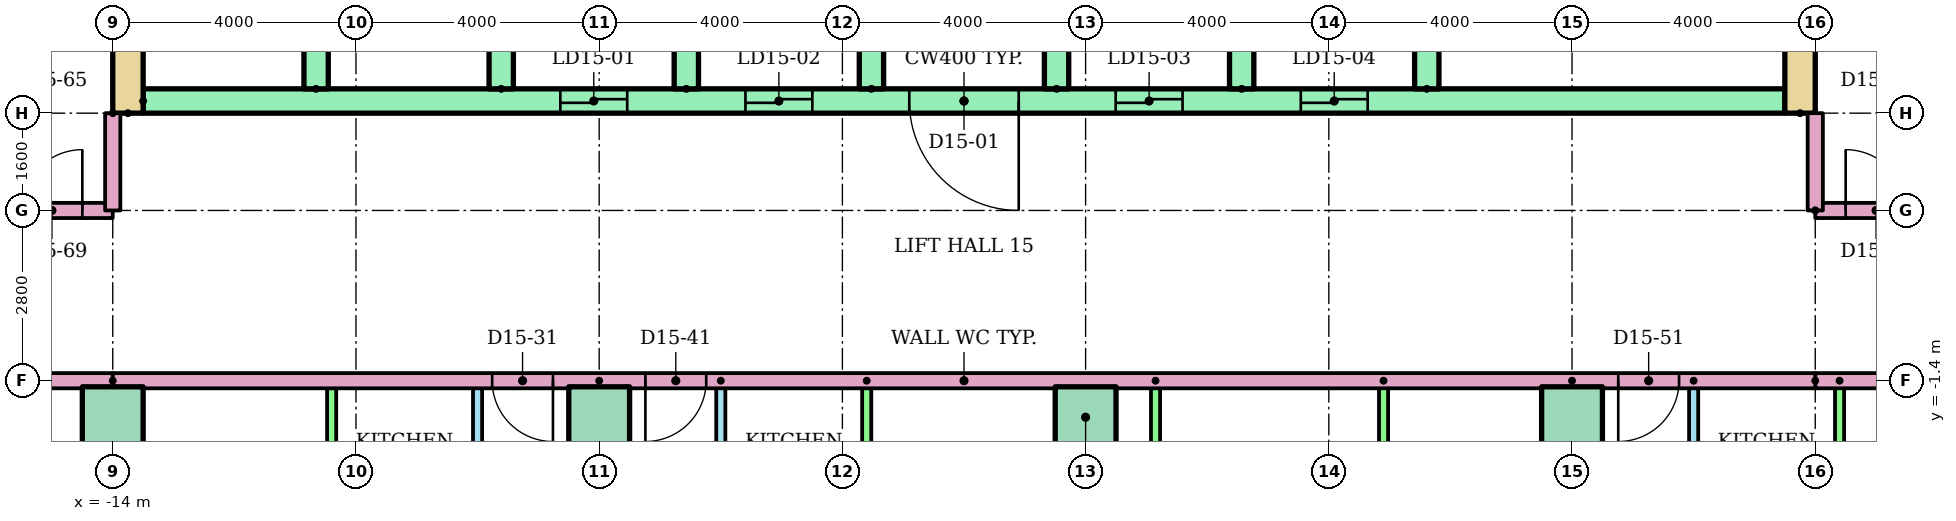
"""IFC4 building model, lengths in metres.
Left out: names, types, materials, properties, quantities, classifications, styles, units other than length and angle.
Written with IfcOpenShell. Run it as: python <this file> out.ifc"""

import sys

from ifc_helpers import new_model, si_unit, direction, frame, frame_2d, origin, origin_2d, place, context, subcontext, project, spatial, rectangle, extrude, element, fill, save


model = new_model("IFC4")
c1 = context("Model", 3, precision=1e-05, world=origin(), true_north=direction((0.0, 1.0)))
c2 = subcontext(c1, "Body", "Model", "MODEL_VIEW")
j1 = project(units=[si_unit("LENGTHUNIT", "METRE"), si_unit("PLANEANGLEUNIT", "RADIAN")], contexts=[c1])
p1 = place(None, origin())
s1 = spatial("IfcSite", under=j1, at=p1, CompositionType="ELEMENT")
p2 = place(p1, origin())
s2 = spatial("IfcBuilding", under=s1, at=p2, CompositionType="ELEMENT")
p3 = place(p2, frame((0.0, 0.0, 57.6)))
s3 = spatial("IfcBuildingStorey", under=s2, at=p3, CompositionType="ELEMENT", Elevation=57.6)
for number, where in (
    (1, (-14.0, -2.0, 0.0)),
    (2, (-6.0, -2.0, 0.0)),
    (3, (2.0, -2.0, 0.0)),
    (4, (10.0, -2.0, 0.0)),
):
    element("IfcColumn", number, at=place(p3, frame(where)), inside=s3, PredefinedType="COLUMN", context=c2, shape_type="SweptSolid", body=[
        extrude(rectangle(XDim=1.0, YDim=1.0, at=origin_2d()), origin(), (0.0, 0.0, 1.0), 3.2),
    ])
for number, where, z_axis, x_axis in (
    (5, (-13.75, 3.0, 0.0), (0.0, 0.0, 1.0), (0.0, 1.0, 0.0)),
    (6, (13.75, 3.0, 0.0), (0.0, 0.0, 1.0), (0.0, 1.0, 0.0)),
):
    element("IfcWall", number, at=place(p3, frame(where, z_axis=z_axis, x_axis=x_axis)), inside=s3, PredefinedType="SHEAR", context=c2, shape_type="SweptSolid", body=[
        extrude(rectangle(XDim=17.0, YDim=0.5, at=frame_2d((8.5, 0.0))), origin(), (0.0, 0.0, 1.0), 2.92),
    ])
p4 = place(p3, frame((-13.5, 3.2, 0.0)))
e7 = element("IfcWall", 7, at=p4, inside=s3, PredefinedType="SHEAR", context=c2, shape_type="SweptSolid", body=[
    extrude(rectangle(XDim=27.0, YDim=0.4, at=frame_2d((13.5, 0.0))), origin(), (0.0, 0.0, 1.0), 2.92),
])
p5 = place(p4, frame((6.861, 0.0, 0.0)))
e8 = element("IfcOpeningElement", 8, at=p5, cuts=e7, PredefinedType="OPENING", context=c2, shape_type="SweptSolid", body=[
    extrude(rectangle(XDim=1.1, YDim=2.1, at=frame_2d((0.55, 1.05))), frame((0.0, 0.21, 0.0), z_axis=(0.0, -1.0, 0.0), x_axis=(1.0, 0.0, 0.0)), (0.0, 0.0, 1.0), 0.42),
])
p6 = place(p4, frame((9.906, 0.0, 0.0)))
e9 = element("IfcOpeningElement", 9, at=p6, cuts=e7, PredefinedType="OPENING", context=c2, shape_type="SweptSolid", body=[
    extrude(rectangle(XDim=1.1, YDim=2.1, at=frame_2d((0.55, 1.05))), frame((0.0, 0.21, 0.0), z_axis=(0.0, -1.0, 0.0), x_axis=(1.0, 0.0, 0.0)), (0.0, 0.0, 1.0), 0.42),
])
p7 = place(p4, frame((15.994, 0.0, 0.0)))
e10 = element("IfcOpeningElement", 10, at=p7, cuts=e7, PredefinedType="OPENING", context=c2, shape_type="SweptSolid", body=[
    extrude(rectangle(XDim=1.1, YDim=2.1, at=frame_2d((0.55, 1.05))), frame((0.0, 0.21, 0.0), z_axis=(0.0, -1.0, 0.0), x_axis=(1.0, 0.0, 0.0)), (0.0, 0.0, 1.0), 0.42),
])
p8 = place(p4, frame((19.039, 0.0, 0.0)))
e11 = element("IfcOpeningElement", 11, at=p8, cuts=e7, PredefinedType="OPENING", context=c2, shape_type="SweptSolid", body=[
    extrude(rectangle(XDim=1.1, YDim=2.1, at=frame_2d((0.55, 1.05))), frame((0.0, 0.21, 0.0), z_axis=(0.0, -1.0, 0.0), x_axis=(1.0, 0.0, 0.0)), (0.0, 0.0, 1.0), 0.42),
])
p9 = place(p4, frame((12.6, 0.0, 0.0)))
e12 = element("IfcOpeningElement", 12, at=p9, cuts=e7, PredefinedType="OPENING", context=c2, shape_type="SweptSolid", body=[
    extrude(rectangle(XDim=1.8, YDim=2.1, at=frame_2d((0.9, 1.05))), frame((0.0, 0.21, 0.0), z_axis=(0.0, -1.0, 0.0), x_axis=(1.0, 0.0, 0.0)), (0.0, 0.0, 1.0), 0.42),
])
for number, where, z_axis, x_axis in (
    (13, (-10.656, 3.4, 0.0), (0.0, 0.0, 1.0), (0.0, 1.0, 0.0)),
    (14, (-7.611, 3.4, 0.0), (0.0, 0.0, 1.0), (0.0, 1.0, 0.0)),
    (15, (-4.567, 3.4, 0.0), (0.0, 0.0, 1.0), (0.0, 1.0, 0.0)),
    (16, (-1.522, 3.4, 0.0), (0.0, 0.0, 1.0), (0.0, 1.0, 0.0)),
    (17, (1.522, 3.4, 0.0), (0.0, 0.0, 1.0), (0.0, 1.0, 0.0)),
    (18, (4.567, 3.4, 0.0), (0.0, 0.0, 1.0), (0.0, 1.0, 0.0)),
    (19, (7.611, 3.4, 0.0), (0.0, 0.0, 1.0), (0.0, 1.0, 0.0)),
):
    element("IfcWall", number, at=place(p3, frame(where, z_axis=z_axis, x_axis=x_axis)), inside=s3, PredefinedType="SHEAR", context=c2, shape_type="SweptSolid", body=[
        extrude(rectangle(XDim=3.0, YDim=0.4, at=frame_2d((1.5, 0.0))), origin(), (0.0, 0.0, 1.0), 2.92),
    ])
p10 = place(p3, frame((-8.0, -6.6, 0.0), z_axis=(0.0, 0.0, 1.0), x_axis=(0.0, 1.0, 0.0)))
e20 = element("IfcWall", 20, at=p10, inside=s3, PredefinedType="PARTITIONING", context=c2, shape_type="SweptSolid", body=[
    extrude(rectangle(XDim=5.2, YDim=0.15, at=frame_2d((2.6, 0.0))), origin(), (0.0, 0.0, 1.0), 2.4),
])
p11 = place(p10, frame((2.94, 0.0, 0.0)))
e21 = element("IfcOpeningElement", 21, at=p11, cuts=e20, PredefinedType="OPENING", context=c2, shape_type="SweptSolid", body=[
    extrude(rectangle(XDim=0.9, YDim=2.1, at=frame_2d((0.45, 1.05))), frame((0.0, 0.085, 0.0), z_axis=(0.0, -1.0, 0.0), x_axis=(1.0, 0.0, 0.0)), (0.0, 0.0, 1.0), 0.17),
])
p12 = place(p10, frame((0.825, 0.0, 0.0)))
e22 = element("IfcOpeningElement", 22, at=p12, cuts=e20, PredefinedType="OPENING", context=c2, shape_type="SweptSolid", body=[
    extrude(rectangle(XDim=0.8, YDim=2.1, at=frame_2d((0.4, 1.05))), frame((0.0, 0.085, 0.0), z_axis=(0.0, -1.0, 0.0), x_axis=(1.0, 0.0, 0.0)), (0.0, 0.0, 1.0), 0.17),
])
p13 = place(p3, frame((-10.4, -6.6, 0.0), z_axis=(0.0, 0.0, 1.0), x_axis=(0.0, 1.0, 0.0)))
e23 = element("IfcWall", 23, at=p13, inside=s3, PredefinedType="PARTITIONING", context=c2, shape_type="SweptSolid", body=[
    extrude(rectangle(XDim=5.2, YDim=0.15, at=frame_2d((2.6, 0.0))), origin(), (0.0, 0.0, 1.0), 2.4),
])
p14 = place(p3, frame((-4.0, -1.4, 0.0), z_axis=(0.0, 0.0, 1.0), x_axis=(0.0, -1.0, 0.0)))
e24 = element("IfcWall", 24, at=p14, inside=s3, PredefinedType="PARTITIONING", context=c2, shape_type="SweptSolid", body=[
    extrude(rectangle(XDim=5.2, YDim=0.15, at=frame_2d((2.6, 0.0))), origin(), (0.0, 0.0, 1.0), 2.4),
])
p15 = place(p14, frame((1.36, 0.0, 0.0)))
e25 = element("IfcOpeningElement", 25, at=p15, cuts=e24, PredefinedType="OPENING", context=c2, shape_type="SweptSolid", body=[
    extrude(rectangle(XDim=0.9, YDim=2.1, at=frame_2d((0.45, 1.05))), frame((0.0, 0.085, 0.0), z_axis=(0.0, -1.0, 0.0), x_axis=(1.0, 0.0, 0.0)), (0.0, 0.0, 1.0), 0.17),
])
p16 = place(p14, frame((3.575, 0.0, 0.0)))
e26 = element("IfcOpeningElement", 26, at=p16, cuts=e24, PredefinedType="OPENING", context=c2, shape_type="SweptSolid", body=[
    extrude(rectangle(XDim=0.8, YDim=2.1, at=frame_2d((0.4, 1.05))), frame((0.0, 0.085, 0.0), z_axis=(0.0, -1.0, 0.0), x_axis=(1.0, 0.0, 0.0)), (0.0, 0.0, 1.0), 0.17),
])
for number, where, z_axis, x_axis in (
    (27, (-1.6, -1.4, 0.0), (0.0, 0.0, 1.0), (0.0, -1.0, 0.0)),
    (28, (3.15, -1.4, 0.0), (0.0, 0.0, 1.0), (0.0, -1.0, 0.0)),
    (29, (6.9, -1.4, 0.0), (0.0, 0.0, 1.0), (0.0, -1.0, 0.0)),
):
    element("IfcWall", number, at=place(p3, frame(where, z_axis=z_axis, x_axis=x_axis)), inside=s3, PredefinedType="PARTITIONING", context=c2, shape_type="SweptSolid", body=[
        extrude(rectangle(XDim=5.2, YDim=0.15, at=frame_2d((2.6, 0.0))), origin(), (0.0, 0.0, 1.0), 2.4),
    ])
p17 = place(p3, frame((-6.0, -1.4, 0.0), z_axis=(0.0, 0.0, 1.0), x_axis=(0.0, -1.0, 0.0)))
e30 = element("IfcWall", 30, at=p17, inside=s3, PredefinedType="PARTITIONING", context=c2, shape_type="SweptSolid", body=[
    extrude(rectangle(XDim=14.71, YDim=0.25, at=frame_2d((7.355, 0.0))), origin(), (0.0, 0.0, 1.0), 2.4),
])
p18 = place(p3, frame((12.0, -1.4, 0.0), z_axis=(0.0, 0.0, 1.0), x_axis=(0.0, -1.0, 0.0)))
e31 = element("IfcWall", 31, at=p18, inside=s3, PredefinedType="PARTITIONING", context=c2, shape_type="SweptSolid", body=[
    extrude(rectangle(XDim=5.2, YDim=0.15, at=frame_2d((2.6, 0.0))), origin(), (0.0, 0.0, 1.0), 2.4),
])
p19 = place(p18, frame((1.36, 0.0, 0.0)))
e32 = element("IfcOpeningElement", 32, at=p19, cuts=e31, PredefinedType="OPENING", context=c2, shape_type="SweptSolid", body=[
    extrude(rectangle(XDim=0.9, YDim=2.1, at=frame_2d((0.45, 1.05))), frame((0.0, 0.085, 0.0), z_axis=(0.0, -1.0, 0.0), x_axis=(1.0, 0.0, 0.0)), (0.0, 0.0, 1.0), 0.17),
])
p20 = place(p18, frame((3.575, 0.0, 0.0)))
e33 = element("IfcOpeningElement", 33, at=p20, cuts=e31, PredefinedType="OPENING", context=c2, shape_type="SweptSolid", body=[
    extrude(rectangle(XDim=0.8, YDim=2.1, at=frame_2d((0.4, 1.05))), frame((0.0, 0.085, 0.0), z_axis=(0.0, -1.0, 0.0), x_axis=(1.0, 0.0, 0.0)), (0.0, 0.0, 1.0), 0.17),
])
p21 = place(p3, frame((14.4, -1.4, 0.0), z_axis=(0.0, 0.0, 1.0), x_axis=(0.0, -1.0, 0.0)))
e34 = element("IfcWall", 34, at=p21, inside=s3, PredefinedType="PARTITIONING", context=c2, shape_type="SweptSolid", body=[
    extrude(rectangle(XDim=5.2, YDim=0.15, at=frame_2d((2.6, 0.0))), origin(), (0.0, 0.0, 1.0), 2.4),
])
p22 = place(p3, frame((10.0, -1.4, 0.0), z_axis=(0.0, 0.0, 1.0), x_axis=(0.0, -1.0, 0.0)))
e35 = element("IfcWall", 35, at=p22, inside=s3, PredefinedType="PARTITIONING", context=c2, shape_type="SweptSolid", body=[
    extrude(rectangle(XDim=14.71, YDim=0.25, at=frame_2d((7.355, 0.0))), origin(), (0.0, 0.0, 1.0), 2.4),
])
p23 = place(p3, frame((-14.0, -1.4, 0.0), z_axis=(0.0, 0.0, 1.0), x_axis=(-1.0, 0.0, 0.0)))
e36 = element("IfcWall", 36, at=p23, inside=s3, PredefinedType="PARTITIONING", context=c2, shape_type="SweptSolid", body=[
    extrude(rectangle(XDim=15.0, YDim=0.25, at=frame_2d((7.5, 0.0))), origin(), (0.0, 0.0, 1.0), 2.4),
])
p24 = place(p23, frame((8.76, 0.0, 0.0)))
e37 = element("IfcOpeningElement", 37, at=p24, cuts=e36, PredefinedType="OPENING", context=c2, shape_type="SweptSolid", body=[
    extrude(rectangle(XDim=1.0, YDim=2.1, at=frame_2d((0.5, 1.05))), frame((0.0, 0.135, 0.0), z_axis=(0.0, -1.0, 0.0), x_axis=(1.0, 0.0, 0.0)), (0.0, 0.0, 1.0), 0.27),
])
p25 = place(p3, frame((29.0, -1.4, 0.0), z_axis=(0.0, 0.0, 1.0), x_axis=(-1.0, 0.0, 0.0)))
e38 = element("IfcWall", 38, at=p25, inside=s3, PredefinedType="PARTITIONING", context=c2, shape_type="SweptSolid", body=[
    extrude(rectangle(XDim=15.0, YDim=0.25, at=frame_2d((7.5, 0.0))), origin(), (0.0, 0.0, 1.0), 2.4),
])
p26 = place(p25, frame((1.24, 0.0, 0.0)))
e39 = element("IfcOpeningElement", 39, at=p26, cuts=e38, PredefinedType="OPENING", context=c2, shape_type="SweptSolid", body=[
    extrude(rectangle(XDim=1.0, YDim=2.1, at=frame_2d((0.5, 1.05))), frame((0.0, 0.135, 0.0), z_axis=(0.0, -1.0, 0.0), x_axis=(1.0, 0.0, 0.0)), (0.0, 0.0, 1.0), 0.27),
])
p27 = place(p3, frame((-29.0, 1.4, 0.0)))
e40 = element("IfcWall", 40, at=p27, inside=s3, PredefinedType="PARTITIONING", context=c2, shape_type="SweptSolid", body=[
    extrude(rectangle(XDim=15.0, YDim=0.25, at=frame_2d((7.5, 0.0))), origin(), (0.0, 0.0, 1.0), 2.4),
])
p28 = place(p27, frame((5.24, 0.0, 0.0)))
e41 = element("IfcOpeningElement", 41, at=p28, cuts=e40, PredefinedType="OPENING", context=c2, shape_type="SweptSolid", body=[
    extrude(rectangle(XDim=1.0, YDim=2.1, at=frame_2d((0.5, 1.05))), frame((0.0, 0.135, 0.0), z_axis=(0.0, -1.0, 0.0), x_axis=(1.0, 0.0, 0.0)), (0.0, 0.0, 1.0), 0.27),
])
p29 = place(p27, frame((13.5, 0.0, 0.0)))
e42 = element("IfcOpeningElement", 42, at=p29, cuts=e40, PredefinedType="OPENING", context=c2, shape_type="SweptSolid", body=[
    extrude(rectangle(XDim=1.0, YDim=2.1, at=frame_2d((0.5, 1.05))), frame((0.0, 0.135, 0.0), z_axis=(0.0, -1.0, 0.0), x_axis=(1.0, 0.0, 0.0)), (0.0, 0.0, 1.0), 0.27),
])
p30 = place(p3, frame((14.0, 1.4, 0.0)))
e43 = element("IfcWall", 43, at=p30, inside=s3, PredefinedType="PARTITIONING", context=c2, shape_type="SweptSolid", body=[
    extrude(rectangle(XDim=15.0, YDim=0.25, at=frame_2d((7.5, 0.0))), origin(), (0.0, 0.0, 1.0), 2.4),
])
p31 = place(p30, frame((0.5, 0.0, 0.0)))
e44 = element("IfcOpeningElement", 44, at=p31, cuts=e43, PredefinedType="OPENING", context=c2, shape_type="SweptSolid", body=[
    extrude(rectangle(XDim=1.0, YDim=2.1, at=frame_2d((0.5, 1.05))), frame((0.0, 0.135, 0.0), z_axis=(0.0, -1.0, 0.0), x_axis=(1.0, 0.0, 0.0)), (0.0, 0.0, 1.0), 0.27),
])
p32 = place(p3, frame((14.0, -1.4, 0.0), z_axis=(0.0, 0.0, 1.0), x_axis=(-1.0, 0.0, 0.0)))
e45 = element("IfcWall", 45, at=p32, inside=s3, PredefinedType="PARTITIONING", context=c2, shape_type="SweptSolid", body=[
    extrude(rectangle(XDim=28.0, YDim=0.25, at=frame_2d((14.0, 0.0))), origin(), (0.0, 0.0, 1.0), 2.4),
])
p33 = place(p32, frame((20.76, 0.0, 0.0)))
e46 = element("IfcOpeningElement", 46, at=p33, cuts=e45, PredefinedType="OPENING", context=c2, shape_type="SweptSolid", body=[
    extrude(rectangle(XDim=1.0, YDim=2.1, at=frame_2d((0.5, 1.05))), frame((0.0, 0.135, 0.0), z_axis=(0.0, -1.0, 0.0), x_axis=(1.0, 0.0, 0.0)), (0.0, 0.0, 1.0), 0.27),
])
p34 = place(p32, frame((18.24, 0.0, 0.0)))
e47 = element("IfcOpeningElement", 47, at=p34, cuts=e45, PredefinedType="OPENING", context=c2, shape_type="SweptSolid", body=[
    extrude(rectangle(XDim=1.0, YDim=2.1, at=frame_2d((0.5, 1.05))), frame((0.0, 0.135, 0.0), z_axis=(0.0, -1.0, 0.0), x_axis=(1.0, 0.0, 0.0)), (0.0, 0.0, 1.0), 0.27),
])
p35 = place(p32, frame((2.24, 0.0, 0.0)))
e48 = element("IfcOpeningElement", 48, at=p35, cuts=e45, PredefinedType="OPENING", context=c2, shape_type="SweptSolid", body=[
    extrude(rectangle(XDim=1.0, YDim=2.1, at=frame_2d((0.5, 1.05))), frame((0.0, 0.135, 0.0), z_axis=(0.0, -1.0, 0.0), x_axis=(1.0, 0.0, 0.0)), (0.0, 0.0, 1.0), 0.27),
])
for number, where, z_axis, x_axis in (
    (49, (-14.0, 3.0, 0.0), (0.0, 0.0, 1.0), (0.0, -1.0, 0.0)),
    (50, (14.0, 1.4, 0.0), (0.0, 0.0, 1.0), (0.0, 1.0, 0.0)),
):
    element("IfcWall", number, at=place(p3, frame(where, z_axis=z_axis, x_axis=x_axis)), inside=s3, PredefinedType="PARTITIONING", context=c2, shape_type="SweptSolid", body=[
        extrude(rectangle(XDim=1.6, YDim=0.25, at=frame_2d((0.8, 0.0))), origin(), (0.0, 0.0, 1.0), 2.4),
    ])
p36 = place(p5, origin())
e51 = element("IfcDoor", 51, at=p36, inside=s3, OperationType="SLIDING_TO_LEFT", PredefinedType="DOOR", context=c2, shape_type="SweptSolid", body=[
    extrude(rectangle(XDim=1.1, YDim=2.1, at=frame_2d((0.55, 1.05))), frame((0.0, 0.025, 0.0), z_axis=(0.0, -1.0, 0.0), x_axis=(1.0, 0.0, 0.0)), (0.0, 0.0, 1.0), 0.05),
])
fill(e8, e51)
p37 = place(p6, origin())
e52 = element("IfcDoor", 52, at=p37, inside=s3, OperationType="SLIDING_TO_LEFT", PredefinedType="DOOR", context=c2, shape_type="SweptSolid", body=[
    extrude(rectangle(XDim=1.1, YDim=2.1, at=frame_2d((0.55, 1.05))), frame((0.0, 0.025, 0.0), z_axis=(0.0, -1.0, 0.0), x_axis=(1.0, 0.0, 0.0)), (0.0, 0.0, 1.0), 0.05),
])
fill(e9, e52)
p38 = place(p7, origin())
e53 = element("IfcDoor", 53, at=p38, inside=s3, OperationType="SLIDING_TO_LEFT", PredefinedType="DOOR", context=c2, shape_type="SweptSolid", body=[
    extrude(rectangle(XDim=1.1, YDim=2.1, at=frame_2d((0.55, 1.05))), frame((0.0, 0.025, 0.0), z_axis=(0.0, -1.0, 0.0), x_axis=(1.0, 0.0, 0.0)), (0.0, 0.0, 1.0), 0.05),
])
fill(e10, e53)
p39 = place(p8, origin())
e54 = element("IfcDoor", 54, at=p39, inside=s3, OperationType="SLIDING_TO_LEFT", PredefinedType="DOOR", context=c2, shape_type="SweptSolid", body=[
    extrude(rectangle(XDim=1.1, YDim=2.1, at=frame_2d((0.55, 1.05))), frame((0.0, 0.025, 0.0), z_axis=(0.0, -1.0, 0.0), x_axis=(1.0, 0.0, 0.0)), (0.0, 0.0, 1.0), 0.05),
])
fill(e11, e54)
p40 = place(p9, frame((1.8, 0.0, 0.0), z_axis=(0.0, 0.0, 1.0), x_axis=(-1.0, 0.0, 0.0)))
e55 = element("IfcDoor", 55, at=p40, inside=s3, OperationType="DOUBLE_DOOR_SINGLE_SWING", PredefinedType="DOOR", context=c2, shape_type="SweptSolid", body=[
    extrude(rectangle(XDim=1.8, YDim=2.1, at=frame_2d((0.9, 1.05))), frame((0.0, 0.025, 0.0), z_axis=(0.0, -1.0, 0.0), x_axis=(1.0, 0.0, 0.0)), (0.0, 0.0, 1.0), 0.05),
])
fill(e12, e55)
p41 = place(p33, origin())
e56 = element("IfcDoor", 56, at=p41, inside=s3, OperationType="SINGLE_SWING_LEFT", PredefinedType="DOOR", context=c2, shape_type="SweptSolid", body=[
    extrude(rectangle(XDim=1.0, YDim=2.1, at=frame_2d((0.5, 1.05))), frame((0.0, 0.025, 0.0), z_axis=(0.0, -1.0, 0.0), x_axis=(1.0, 0.0, 0.0)), (0.0, 0.0, 1.0), 0.05),
])
fill(e46, e56)
p42 = place(p34, origin())
e57 = element("IfcDoor", 57, at=p42, inside=s3, OperationType="SINGLE_SWING_RIGHT", PredefinedType="DOOR", context=c2, shape_type="SweptSolid", body=[
    extrude(rectangle(XDim=1.0, YDim=2.1, at=frame_2d((0.5, 1.05))), frame((0.0, 0.025, 0.0), z_axis=(0.0, -1.0, 0.0), x_axis=(1.0, 0.0, 0.0)), (0.0, 0.0, 1.0), 0.05),
])
fill(e47, e57)
p43 = place(p35, origin())
e58 = element("IfcDoor", 58, at=p43, inside=s3, OperationType="SINGLE_SWING_RIGHT", PredefinedType="DOOR", context=c2, shape_type="SweptSolid", body=[
    extrude(rectangle(XDim=1.0, YDim=2.1, at=frame_2d((0.5, 1.05))), frame((0.0, 0.025, 0.0), z_axis=(0.0, -1.0, 0.0), x_axis=(1.0, 0.0, 0.0)), (0.0, 0.0, 1.0), 0.05),
])
fill(e48, e58)
p44 = place(p29, origin())
e59 = element("IfcDoor", 59, at=p44, inside=s3, OperationType="SINGLE_SWING_RIGHT", PredefinedType="DOOR", context=c2, shape_type="SweptSolid", body=[
    extrude(rectangle(XDim=1.0, YDim=2.1, at=frame_2d((0.5, 1.05))), frame((0.0, 0.025, 0.0), z_axis=(0.0, -1.0, 0.0), x_axis=(1.0, 0.0, 0.0)), (0.0, 0.0, 1.0), 0.05),
])
fill(e42, e59)
p45 = place(p31, origin())
e60 = element("IfcDoor", 60, at=p45, inside=s3, OperationType="SINGLE_SWING_LEFT", PredefinedType="DOOR", context=c2, shape_type="SweptSolid", body=[
    extrude(rectangle(XDim=1.0, YDim=2.1, at=frame_2d((0.5, 1.05))), frame((0.0, 0.025, 0.0), z_axis=(0.0, -1.0, 0.0), x_axis=(1.0, 0.0, 0.0)), (0.0, 0.0, 1.0), 0.05),
])
fill(e44, e60)
save(model, sys.argv[1])
